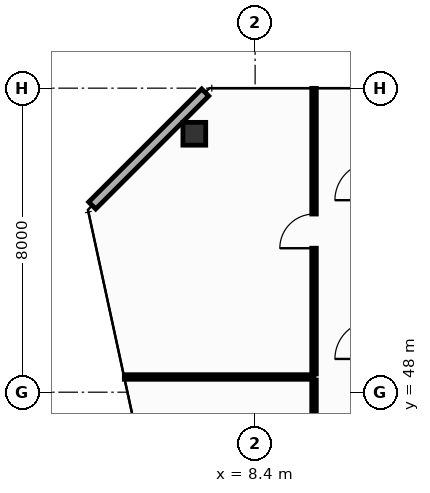
"""IFC4 building model, lengths in metres.
Left out: names, types, materials, properties, quantities, classifications, styles, units other than length and angle.
Written with IfcOpenShell. Run it as: python <this file> out.ifc"""

import sys

from ifc_helpers import new_model, si_unit, direction, frame, frame_2d, origin, origin_2d, place, context, subcontext, project, spatial, rectangle, hollow_rectangle, extrude, element, fill, save


model = new_model("IFC4")
c1 = context("Model", 3, precision=1e-05, world=origin(), true_north=direction((0.0, 1.0)))
c2 = subcontext(c1, "Body", "Model", "MODEL_VIEW")
j1 = project(units=[si_unit("LENGTHUNIT", "METRE"), si_unit("PLANEANGLEUNIT", "RADIAN")], contexts=[c1])
p1 = place(None, origin())
s1 = spatial("IfcSite", under=j1, at=p1, CompositionType="ELEMENT")
p2 = place(p1, origin())
s2 = spatial("IfcBuilding", under=s1, at=p2, CompositionType="ELEMENT")
p3 = place(p2, frame((0.0, 0.0, 319.2)))
s3 = spatial("IfcBuildingStorey", under=s2, at=p3, CompositionType="ELEMENT", Elevation=319.2)
p4 = place(p3, frame((6.8, 54.8, 0.0), z_axis=(0.0, 0.0, 1.0), x_axis=(1.0, 0.0, 0.0)))
e1 = element("IfcColumn", 1, at=p4, inside=s3, PredefinedType="COLUMN", context=c2, shape_type="SweptSolid", body=[
    extrude(hollow_rectangle(XDim=0.6, YDim=0.6, WallThickness=0.028, at=origin_2d()), origin(), (0.0, 0.0, 1.0), 4.2),
])
p5 = place(p3, frame((7.087, 55.887, 0.0), z_axis=(0.0, 0.0, 1.0), x_axis=(-0.707106781187, -0.707106781187, 0.0)))
e2 = element("IfcWall", 2, at=p5, inside=s3, PredefinedType="STANDARD", context=c2, shape_type="SweptSolid", body=[
    extrude(rectangle(XDim=4.206, YDim=0.26, at=frame_2d((2.103, 0.0))), origin(), (0.0, 0.0, 1.0), 3.95),
])
p6 = place(p3, frame((4.958, 48.4, 0.0), z_axis=(0.0, 0.0, 1.0), x_axis=(1.0, 0.0, 0.0)))
e3 = element("IfcWall", 3, at=p6, inside=s3, PredefinedType="PARTITIONING", context=c2, shape_type="SweptSolid", body=[
    extrude(rectangle(XDim=4.991, YDim=0.12, at=frame_2d((2.496, 0.0))), origin(), (0.0, 0.0, 1.0), 3.347),
])
p7 = place(p3, frame((9.95, 42.02, 0.0), z_axis=(0.0, 0.0, 1.0), x_axis=(0.0, 1.0, 0.0)))
e4 = element("IfcWall", 4, at=p7, inside=s3, PredefinedType="PARTITIONING", context=c2, shape_type="SweptSolid", body=[
    extrude(rectangle(XDim=6.3, YDim=0.12, at=frame_2d((3.15, 0.0))), origin(), (0.0, 0.0, 1.0), 3.347),
])
p8 = place(p7, frame((2.7, 0.0, 0.0)))
e5 = element("IfcOpeningElement", 5, at=p8, cuts=e4, PredefinedType="OPENING", context=c2, shape_type="SweptSolid", body=[
    extrude(rectangle(XDim=0.9, YDim=2.1, at=frame_2d((0.45, 1.05))), frame((0.0, 0.07, 0.0), z_axis=(0.0, -1.0, 0.0), x_axis=(1.0, 0.0, 0.0)), (0.0, 0.0, 1.0), 0.14),
])
p9 = place(p3, frame((9.95, 48.48, 0.0), z_axis=(0.0, 0.0, 1.0), x_axis=(0.0, 1.0, 0.0)))
e6 = element("IfcWall", 6, at=p9, inside=s3, PredefinedType="PARTITIONING", context=c2, shape_type="SweptSolid", body=[
    extrude(rectangle(XDim=7.515, YDim=0.12, at=frame_2d((3.758, 0.0))), origin(), (0.0, 0.0, 1.0), 3.335),
])
p10 = place(p9, frame((3.308, 0.0, 0.0)))
e7 = element("IfcOpeningElement", 7, at=p10, cuts=e6, PredefinedType="OPENING", context=c2, shape_type="SweptSolid", body=[
    extrude(rectangle(XDim=0.9, YDim=2.1, at=frame_2d((0.45, 1.05))), frame((0.0, 0.07, 0.0), z_axis=(0.0, -1.0, 0.0), x_axis=(1.0, 0.0, 0.0)), (0.0, 0.0, 1.0), 0.14),
])
p11 = place(p10, origin())
e8 = element("IfcDoor", 8, at=p11, inside=s3, OperationType="SINGLE_SWING_LEFT", PredefinedType="DOOR", context=c2, shape_type="SweptSolid", body=[
    extrude(rectangle(XDim=0.9, YDim=2.1, at=frame_2d((0.45, 1.05))), frame((0.0, 0.025, 0.0), z_axis=(0.0, -1.0, 0.0), x_axis=(1.0, 0.0, 0.0)), (0.0, 0.0, 1.0), 0.05),
])
fill(e7, e8)
save(model, sys.argv[1])
